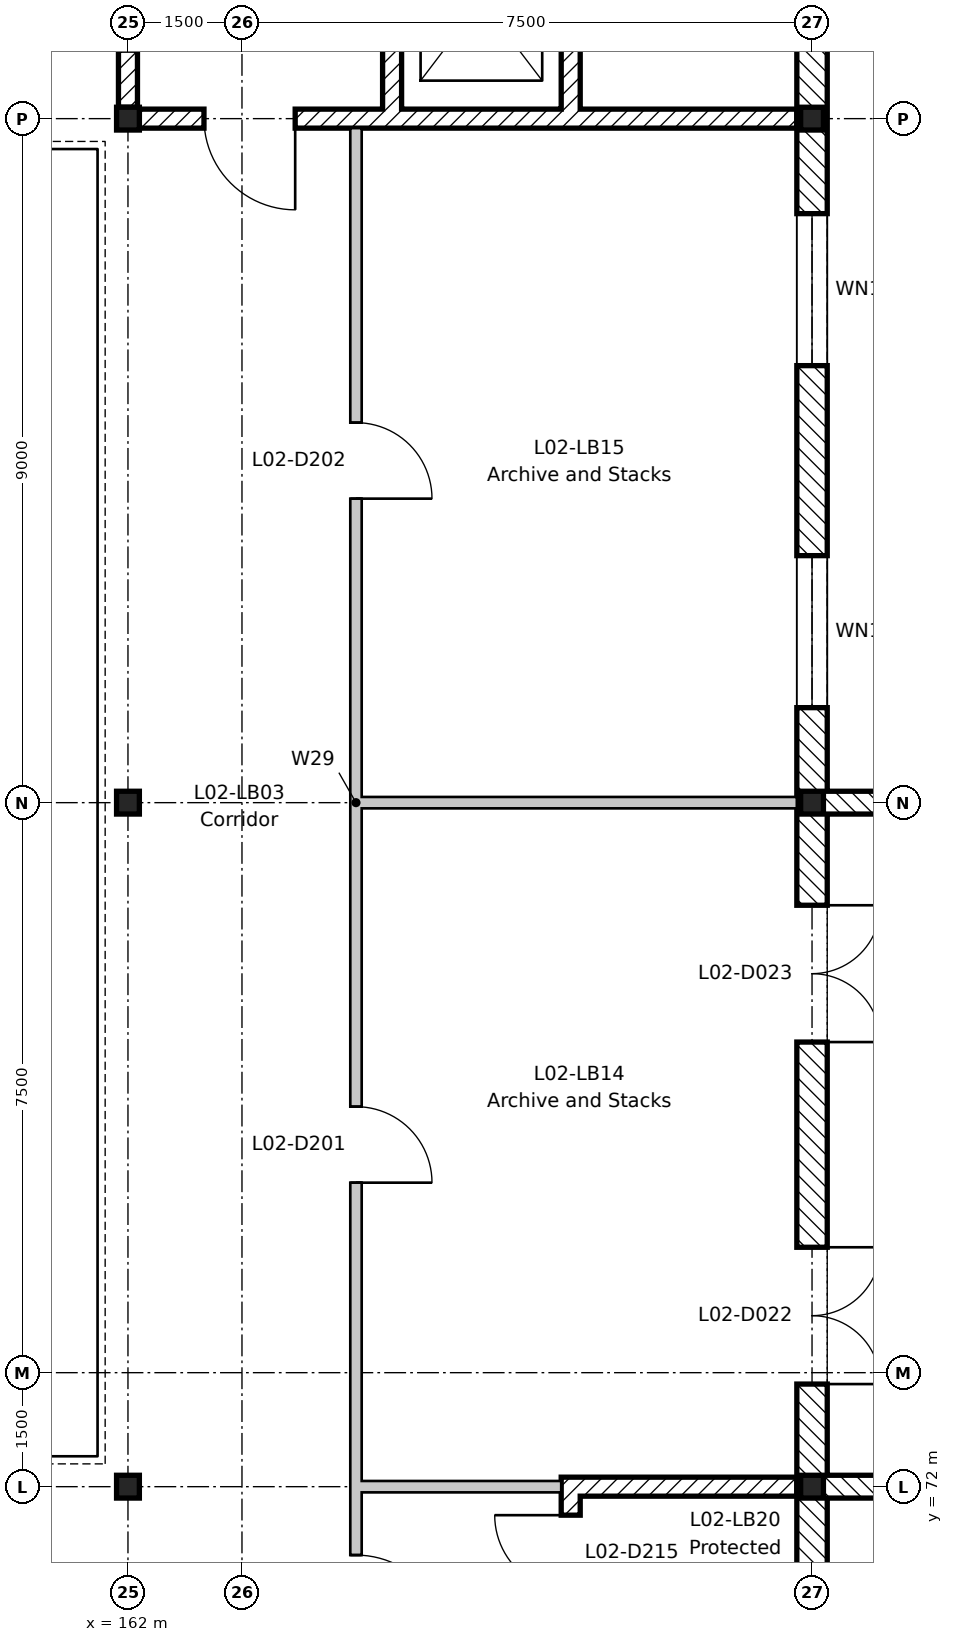
"""IFC4 building model, lengths in metres.
Left out: names, types, materials, properties, quantities, classifications, styles, units other than length and angle.
Written with IfcOpenShell. Run it as: python <this file> out.ifc"""

import sys

from ifc_helpers import new_model, si_unit, direction, frame, frame_2d, origin, origin_2d, place, context, subcontext, project, spatial, rectangle, i_section, extrude, element, fill, save


model = new_model("IFC4")
c1 = context("Model", 3, precision=1e-05, world=origin(), true_north=direction((0.0, 1.0)))
c2 = subcontext(c1, "Body", "Model", "MODEL_VIEW")
j1 = project(units=[si_unit("LENGTHUNIT", "METRE"), si_unit("PLANEANGLEUNIT", "RADIAN")], contexts=[c1])
p1 = place(None, origin())
s1 = spatial("IfcSite", under=j1, at=p1, CompositionType="ELEMENT")
p2 = place(p1, origin())
s2 = spatial("IfcBuilding", under=s1, at=p2, CompositionType="ELEMENT")
p3 = place(p2, frame((0.0, 0.0, 9.9)))
s3 = spatial("IfcBuildingStorey", under=s2, at=p3, CompositionType="ELEMENT", Elevation=9.9)
for number, where, z_axis, x_axis in (
    (1, (162.0, 72.0, -0.2), (0.0, 0.0, 1.0), (1.0, 0.0, 0.0)),
    (2, (162.0, 81.0, -0.2), (0.0, 0.0, 1.0), (1.0, 0.0, 0.0)),
    (3, (162.0, 90.0, -0.2), (0.0, 0.0, 1.0), (1.0, 0.0, 0.0)),
    (4, (171.0, 72.0, -0.2), (0.0, 0.0, 1.0), (1.0, 0.0, 0.0)),
    (5, (171.0, 81.0, -0.2), (0.0, 0.0, 1.0), (1.0, 0.0, 0.0)),
    (6, (171.0, 90.0, -0.2), (0.0, 0.0, 1.0), (1.0, 0.0, 0.0)),
):
    element("IfcColumn", number, at=place(p3, frame(where, z_axis=z_axis, x_axis=x_axis)), inside=s3, PredefinedType="COLUMN", context=c2, shape_type="SweptSolid", body=[
        extrude(i_section(OverallWidth=0.3, OverallDepth=0.3, WebThickness=0.011, FlangeThickness=0.019, FilletRadius=0.027, at=origin_2d()), origin(), (0.0, 0.0, 1.0), 4.45),
    ])
p4 = place(p3, frame((167.825, 98.8, 0.0), z_axis=(0.0, 0.0, 1.0), x_axis=(0.0, -1.0, 0.0)))
e7 = element("IfcWall", 7, at=p4, inside=s3, PredefinedType="SHEAR", context=c2, shape_type="SweptSolid", body=[
    extrude(rectangle(XDim=8.675, YDim=0.25, at=frame_2d((4.337, 0.0))), origin(), (0.0, 0.0, 1.0), 4.25),
])
p5 = place(p4, frame((0.25, 0.0, 0.0)))
e8 = element("IfcOpeningElement", 8, at=p5, cuts=e7, PredefinedType="OPENING", context=c2, shape_type="SweptSolid", body=[
    extrude(rectangle(XDim=1.0, YDim=2.1, at=frame_2d((0.5, 1.05))), frame((0.0, 0.135, 0.0), z_axis=(0.0, -1.0, 0.0), x_axis=(1.0, 0.0, 0.0)), (0.0, 0.0, 1.0), 0.27),
])
p6 = place(p3, frame((162.0, 98.8, 0.0), z_axis=(0.0, 0.0, 1.0), x_axis=(0.0, -1.0, 0.0)))
e9 = element("IfcWall", 9, at=p6, inside=s3, PredefinedType="SHEAR", context=c2, shape_type="SweptSolid", body=[
    extrude(rectangle(XDim=8.65, YDim=0.25, at=frame_2d((4.325, 0.0))), origin(), (0.0, 0.0, 1.0), 4.25),
])
p7 = place(p6, frame((6.7, 0.0, 0.0)))
e10 = element("IfcOpeningElement", 10, at=p7, cuts=e9, PredefinedType="OPENING", context=c2, shape_type="SweptSolid", body=[
    extrude(rectangle(XDim=1.2, YDim=2.1, at=frame_2d((0.6, 1.05))), frame((0.0, 0.135, 0.0), z_axis=(0.0, -1.0, 0.0), x_axis=(1.0, 0.0, 0.0)), (0.0, 0.0, 1.0), 0.27),
])
p8 = place(p3, frame((170.8, 90.0, 0.0), z_axis=(0.0, 0.0, 1.0), x_axis=(-1.0, 0.0, 0.0)))
e11 = element("IfcWall", 11, at=p8, inside=s3, PredefinedType="SHEAR", context=c2, shape_type="SweptSolid", body=[
    extrude(rectangle(XDim=8.65, YDim=0.25, at=frame_2d((4.325, 0.0))), origin(), (0.0, 0.0, 1.0), 4.25),
])
p9 = place(p8, frame((6.6, 0.0, 0.0)))
e12 = element("IfcOpeningElement", 12, at=p9, cuts=e11, PredefinedType="OPENING", context=c2, shape_type="SweptSolid", body=[
    extrude(rectangle(XDim=1.2, YDim=2.1, at=frame_2d((0.6, 1.05))), frame((0.0, 0.135, 0.0), z_axis=(0.0, -1.0, 0.0), x_axis=(1.0, 0.0, 0.0)), (0.0, 0.0, 1.0), 0.27),
])
p10 = place(p3, frame((165.475, 92.725, 0.0), z_axis=(0.0, 0.0, 1.0), x_axis=(0.0, -1.0, 0.0)))
e13 = element("IfcWall", 13, at=p10, inside=s3, PredefinedType="SHEAR", context=c2, shape_type="SweptSolid", body=[
    extrude(rectangle(XDim=2.6, YDim=0.25, at=frame_2d((1.3, 0.0))), origin(), (0.0, 0.0, 1.0), 4.25),
])
p11 = place(p3, frame((167.825, 71.875, 0.0), z_axis=(0.0, 0.0, 1.0), x_axis=(0.0, -1.0, 0.0)))
e14 = element("IfcWall", 14, at=p11, inside=s3, PredefinedType="SHEAR", context=c2, shape_type="SweptSolid", body=[
    extrude(rectangle(XDim=8.675, YDim=0.25, at=frame_2d((4.337, 0.0))), origin(), (0.0, 0.0, 1.0), 4.25),
])
p12 = place(p11, frame((0.25, 0.0, 0.0)))
e15 = element("IfcOpeningElement", 15, at=p12, cuts=e14, PredefinedType="OPENING", context=c2, shape_type="SweptSolid", body=[
    extrude(rectangle(XDim=1.0, YDim=2.1, at=frame_2d((0.5, 1.05))), frame((0.0, 0.135, 0.0), z_axis=(0.0, -1.0, 0.0), x_axis=(1.0, 0.0, 0.0)), (0.0, 0.0, 1.0), 0.27),
])
p13 = place(p3, frame((170.8, 72.0, 0.0), z_axis=(0.0, 0.0, 1.0), x_axis=(-1.0, 0.0, 0.0)))
e16 = element("IfcWall", 16, at=p13, inside=s3, PredefinedType="SHEAR", context=c2, shape_type="SweptSolid", body=[
    extrude(rectangle(XDim=3.1, YDim=0.25, at=frame_2d((1.55, 0.0))), origin(), (0.0, 0.0, 1.0), 4.25),
])
for number, where, z_axis, x_axis in (
    (17, (171.15, 72.0, 0.0), (0.0, 0.0, 1.0), (1.0, 0.0, 0.0)),
    (18, (171.15, 81.0, 0.0), (0.0, 0.0, 1.0), (1.0, 0.0, 0.0)),
):
    element("IfcWall", number, at=place(p3, frame(where, z_axis=z_axis, x_axis=x_axis)), inside=s3, PredefinedType="STANDARD", context=c2, shape_type="SweptSolid", body=[
        extrude(rectangle(XDim=2.85, YDim=0.3, at=frame_2d((1.425, 0.0))), origin(), (0.0, 0.0, 1.0), 3.97),
    ])
p14 = place(p3, frame((171.0, 63.2, 0.0), z_axis=(0.0, 0.0, 1.0), x_axis=(0.0, 1.0, 0.0)))
e19 = element("IfcWall", 19, at=p14, inside=s3, PredefinedType="STANDARD", context=c2, shape_type="SweptSolid", body=[
    extrude(rectangle(XDim=35.6, YDim=0.4, at=frame_2d((17.8, 0.0))), origin(), (0.0, 0.0, 1.0), 4.25),
])
p15 = place(p14, frame((1.05, 0.0, 0.5)))
e20 = element("IfcOpeningElement", 20, at=p15, cuts=e19, PredefinedType="OPENING", context=c2, shape_type="SweptSolid", body=[
    extrude(rectangle(XDim=2.0, YDim=3.2, at=frame_2d((1.0, 1.6))), frame((0.0, 0.21, 0.0), z_axis=(0.0, -1.0, 0.0), x_axis=(1.0, 0.0, 0.0)), (0.0, 0.0, 1.0), 0.42),
])
p16 = place(p14, frame((5.55, 0.0, 0.5)))
e21 = element("IfcOpeningElement", 21, at=p16, cuts=e19, PredefinedType="OPENING", context=c2, shape_type="SweptSolid", body=[
    extrude(rectangle(XDim=2.0, YDim=3.2, at=frame_2d((1.0, 1.6))), frame((0.0, 0.21, 0.0), z_axis=(0.0, -1.0, 0.0), x_axis=(1.0, 0.0, 0.0)), (0.0, 0.0, 1.0), 0.42),
])
p17 = place(p14, frame((19.05, 0.0, 0.5)))
e22 = element("IfcOpeningElement", 22, at=p17, cuts=e19, PredefinedType="OPENING", context=c2, shape_type="SweptSolid", body=[
    extrude(rectangle(XDim=2.0, YDim=3.2, at=frame_2d((1.0, 1.6))), frame((0.0, 0.21, 0.0), z_axis=(0.0, -1.0, 0.0), x_axis=(1.0, 0.0, 0.0)), (0.0, 0.0, 1.0), 0.42),
])
p18 = place(p14, frame((23.55, 0.0, 0.5)))
e23 = element("IfcOpeningElement", 23, at=p18, cuts=e19, PredefinedType="OPENING", context=c2, shape_type="SweptSolid", body=[
    extrude(rectangle(XDim=2.0, YDim=3.2, at=frame_2d((1.0, 1.6))), frame((0.0, 0.21, 0.0), z_axis=(0.0, -1.0, 0.0), x_axis=(1.0, 0.0, 0.0)), (0.0, 0.0, 1.0), 0.42),
])
p19 = place(p14, frame((10.15, 0.0, 0.0)))
e24 = element("IfcOpeningElement", 24, at=p19, cuts=e19, PredefinedType="OPENING", context=c2, shape_type="SweptSolid", body=[
    extrude(rectangle(XDim=1.8, YDim=2.4, at=frame_2d((0.9, 1.2))), frame((0.0, 0.21, 0.0), z_axis=(0.0, -1.0, 0.0), x_axis=(1.0, 0.0, 0.0)), (0.0, 0.0, 1.0), 0.42),
])
p20 = place(p14, frame((14.65, 0.0, 0.0)))
e25 = element("IfcOpeningElement", 25, at=p20, cuts=e19, PredefinedType="OPENING", context=c2, shape_type="SweptSolid", body=[
    extrude(rectangle(XDim=1.8, YDim=2.4, at=frame_2d((0.9, 1.2))), frame((0.0, 0.21, 0.0), z_axis=(0.0, -1.0, 0.0), x_axis=(1.0, 0.0, 0.0)), (0.0, 0.0, 1.0), 0.42),
])
p21 = place(p3, frame((165.075, 72.0, 0.0), z_axis=(0.0, 0.0, 1.0), x_axis=(1.0, 0.0, 0.0)))
e26 = element("IfcWall", 26, at=p21, inside=s3, PredefinedType="PARTITIONING", context=c2, shape_type="SweptSolid", body=[
    extrude(rectangle(XDim=2.625, YDim=0.15, at=frame_2d((1.312, 0.0))), origin(), (0.0, 0.0, 1.0), 4.25),
])
p22 = place(p3, frame((165.075, 81.0, 0.0), z_axis=(0.0, 0.0, 1.0), x_axis=(1.0, 0.0, 0.0)))
e27 = element("IfcWall", 27, at=p22, inside=s3, PredefinedType="PARTITIONING", context=c2, shape_type="SweptSolid", body=[
    extrude(rectangle(XDim=5.725, YDim=0.15, at=frame_2d((2.863, 0.0))), origin(), (0.0, 0.0, 1.0), 4.25),
])
p23 = place(p3, frame((165.0, 69.075, 0.0), z_axis=(0.0, 0.0, 1.0), x_axis=(0.0, 1.0, 0.0)))
e28 = element("IfcWall", 28, at=p23, inside=s3, PredefinedType="PARTITIONING", context=c2, shape_type="SweptSolid", body=[
    extrude(rectangle(XDim=20.8, YDim=0.15, at=frame_2d((10.4, 0.0))), origin(), (0.0, 0.0, 1.0), 4.25),
])
p24 = place(p23, frame((0.825, 0.0, 0.0)))
e29 = element("IfcOpeningElement", 29, at=p24, cuts=e28, PredefinedType="OPENING", context=c2, shape_type="SweptSolid", body=[
    extrude(rectangle(XDim=1.2, YDim=2.1, at=frame_2d((0.6, 1.05))), frame((0.0, 0.085, 0.0), z_axis=(0.0, -1.0, 0.0), x_axis=(1.0, 0.0, 0.0)), (0.0, 0.0, 1.0), 0.17),
])
p25 = place(p23, frame((6.925, 0.0, 0.0)))
e30 = element("IfcOpeningElement", 30, at=p25, cuts=e28, PredefinedType="OPENING", context=c2, shape_type="SweptSolid", body=[
    extrude(rectangle(XDim=1.0, YDim=2.1, at=frame_2d((0.5, 1.05))), frame((0.0, 0.085, 0.0), z_axis=(0.0, -1.0, 0.0), x_axis=(1.0, 0.0, 0.0)), (0.0, 0.0, 1.0), 0.17),
])
p26 = place(p23, frame((15.925, 0.0, 0.0)))
e31 = element("IfcOpeningElement", 31, at=p26, cuts=e28, PredefinedType="OPENING", context=c2, shape_type="SweptSolid", body=[
    extrude(rectangle(XDim=1.0, YDim=2.1, at=frame_2d((0.5, 1.05))), frame((0.0, 0.085, 0.0), z_axis=(0.0, -1.0, 0.0), x_axis=(1.0, 0.0, 0.0)), (0.0, 0.0, 1.0), 0.17),
])
p27 = place(p17, origin())
e32 = element("IfcWindow", 32, at=p27, inside=s3, PartitioningType="SINGLE_PANEL", PredefinedType="WINDOW", context=c2, shape_type="SweptSolid", body=[
    extrude(rectangle(XDim=2.0, YDim=3.2, at=frame_2d((1.0, 1.6))), frame((0.0, 0.03, 0.0), z_axis=(0.0, -1.0, 0.0), x_axis=(1.0, 0.0, 0.0)), (0.0, 0.0, 1.0), 0.06),
])
fill(e22, e32)
p28 = place(p18, origin())
e33 = element("IfcWindow", 33, at=p28, inside=s3, PartitioningType="SINGLE_PANEL", PredefinedType="WINDOW", context=c2, shape_type="SweptSolid", body=[
    extrude(rectangle(XDim=2.0, YDim=3.2, at=frame_2d((1.0, 1.6))), frame((0.0, 0.03, 0.0), z_axis=(0.0, -1.0, 0.0), x_axis=(1.0, 0.0, 0.0)), (0.0, 0.0, 1.0), 0.06),
])
fill(e23, e33)
p29 = place(p19, frame((1.8, 0.0, 0.0), z_axis=(0.0, 0.0, 1.0), x_axis=(-1.0, 0.0, 0.0)))
e34 = element("IfcDoor", 34, at=p29, inside=s3, OperationType="DOUBLE_DOOR_SINGLE_SWING", PredefinedType="DOOR", context=c2, shape_type="SweptSolid", body=[
    extrude(rectangle(XDim=1.8, YDim=2.4, at=frame_2d((0.9, 1.2))), frame((0.0, 0.025, 0.0), z_axis=(0.0, -1.0, 0.0), x_axis=(1.0, 0.0, 0.0)), (0.0, 0.0, 1.0), 0.05),
])
fill(e24, e34)
p30 = place(p20, frame((1.8, 0.0, 0.0), z_axis=(0.0, 0.0, 1.0), x_axis=(-1.0, 0.0, 0.0)))
e35 = element("IfcDoor", 35, at=p30, inside=s3, OperationType="DOUBLE_DOOR_SINGLE_SWING", PredefinedType="DOOR", context=c2, shape_type="SweptSolid", body=[
    extrude(rectangle(XDim=1.8, YDim=2.4, at=frame_2d((0.9, 1.2))), frame((0.0, 0.025, 0.0), z_axis=(0.0, -1.0, 0.0), x_axis=(1.0, 0.0, 0.0)), (0.0, 0.0, 1.0), 0.05),
])
fill(e25, e35)
p31 = place(p24, frame((1.2, 0.0, 0.0), z_axis=(0.0, 0.0, 1.0), x_axis=(-1.0, 0.0, 0.0)))
e36 = element("IfcDoor", 36, at=p31, inside=s3, OperationType="SINGLE_SWING_RIGHT", PredefinedType="DOOR", context=c2, shape_type="SweptSolid", body=[
    extrude(rectangle(XDim=1.2, YDim=2.1, at=frame_2d((0.6, 1.05))), frame((0.0, 0.025, 0.0), z_axis=(0.0, -1.0, 0.0), x_axis=(1.0, 0.0, 0.0)), (0.0, 0.0, 1.0), 0.05),
])
fill(e29, e36)
p32 = place(p25, frame((1.0, 0.0, 0.0), z_axis=(0.0, 0.0, 1.0), x_axis=(-1.0, 0.0, 0.0)))
e37 = element("IfcDoor", 37, at=p32, inside=s3, OperationType="SINGLE_SWING_RIGHT", PredefinedType="DOOR", context=c2, shape_type="SweptSolid", body=[
    extrude(rectangle(XDim=1.0, YDim=2.1, at=frame_2d((0.5, 1.05))), frame((0.0, 0.025, 0.0), z_axis=(0.0, -1.0, 0.0), x_axis=(1.0, 0.0, 0.0)), (0.0, 0.0, 1.0), 0.05),
])
fill(e30, e37)
p33 = place(p26, frame((1.0, 0.0, 0.0), z_axis=(0.0, 0.0, 1.0), x_axis=(-1.0, 0.0, 0.0)))
e38 = element("IfcDoor", 38, at=p33, inside=s3, OperationType="SINGLE_SWING_RIGHT", PredefinedType="DOOR", context=c2, shape_type="SweptSolid", body=[
    extrude(rectangle(XDim=1.0, YDim=2.1, at=frame_2d((0.5, 1.05))), frame((0.0, 0.025, 0.0), z_axis=(0.0, -1.0, 0.0), x_axis=(1.0, 0.0, 0.0)), (0.0, 0.0, 1.0), 0.05),
])
fill(e31, e38)
p34 = place(p9, origin())
e39 = element("IfcDoor", 39, at=p34, inside=s3, OperationType="SINGLE_SWING_LEFT", PredefinedType="DOOR", context=c2, shape_type="SweptSolid", body=[
    extrude(rectangle(XDim=1.2, YDim=2.1, at=frame_2d((0.6, 1.05))), frame((0.0, 0.025, 0.0), z_axis=(0.0, -1.0, 0.0), x_axis=(1.0, 0.0, 0.0)), (0.0, 0.0, 1.0), 0.05),
])
fill(e12, e39)
p35 = place(p12, frame((1.0, 0.0, 0.0), z_axis=(0.0, 0.0, 1.0), x_axis=(-1.0, 0.0, 0.0)))
e40 = element("IfcDoor", 40, at=p35, inside=s3, OperationType="SINGLE_SWING_RIGHT", PredefinedType="DOOR", context=c2, shape_type="SweptSolid", body=[
    extrude(rectangle(XDim=1.0, YDim=2.1, at=frame_2d((0.5, 1.05))), frame((0.0, 0.025, 0.0), z_axis=(0.0, -1.0, 0.0), x_axis=(1.0, 0.0, 0.0)), (0.0, 0.0, 1.0), 0.05),
])
fill(e15, e40)
save(model, sys.argv[1])
